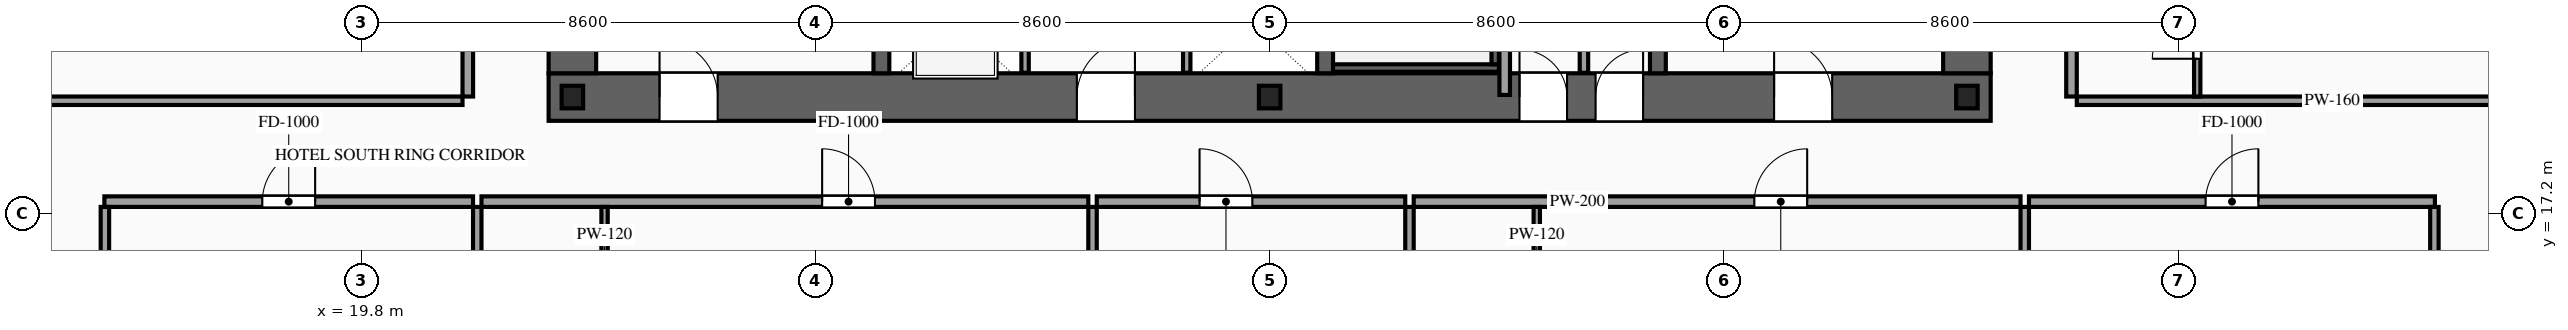
"""IFC4 building model, lengths in metres.
Left out: names, types, materials, properties, quantities, classifications, styles, units other than length and angle.
Written with IfcOpenShell. Run it as: python <this file> out.ifc"""

import sys

from ifc_helpers import new_model, si_unit, direction, frame, frame_2d, origin, origin_2d, place, context, subcontext, project, spatial, rectangle, i_section, extrude, source, transform, mapped, element, fill, save


model = new_model("IFC4")
c1 = context("Model", 3, precision=1e-05, world=origin(), true_north=direction((0.0, 1.0)))
c2 = subcontext(c1, "Body", "Model", "MODEL_VIEW")
j1 = project(units=[si_unit("LENGTHUNIT", "METRE"), si_unit("PLANEANGLEUNIT", "RADIAN")], contexts=[c1])
p1 = place(None, origin())
s1 = spatial("IfcSite", under=j1, at=p1, CompositionType="ELEMENT")
p2 = place(p1, origin())
s2 = spatial("IfcBuilding", under=s1, at=p2, CompositionType="ELEMENT")
p3 = place(p2, frame((0.0, 0.0, 82.0)))
s3 = spatial("IfcBuildingStorey", under=s2, at=p3, CompositionType="ELEMENT", Elevation=82.0)
p4 = place(p3, frame((23.35, 19.4, 0.0), z_axis=(0.0, 0.0, 1.0), x_axis=(1.0, 0.0, 0.0)))
e1 = element("IfcWall", 1, at=p4, inside=s3, PredefinedType="SHEAR", context=c2, shape_type="SweptSolid", body=[
    extrude(rectangle(XDim=27.3, YDim=0.9, at=frame_2d((13.65, 0.0))), origin(), (0.0, 0.0, 1.0), 3.6),
])
p5 = place(p4, frame((2.1, 0.0, 0.0)))
e2 = element("IfcOpeningElement", 2, at=p5, cuts=e1, PredefinedType="OPENING", context=c2, shape_type="SweptSolid", body=[
    extrude(rectangle(XDim=1.1, YDim=2.2, at=frame_2d((0.55, 1.1))), frame((0.0, 0.465, 0.0), z_axis=(0.0, -1.0, 0.0), x_axis=(1.0, 0.0, 0.0)), (0.0, 0.0, 1.0), 0.93),
])
p6 = place(p4, frame((10.0, 0.0, 0.0)))
e3 = element("IfcOpeningElement", 3, at=p6, cuts=e1, PredefinedType="OPENING", context=c2, shape_type="SweptSolid", body=[
    extrude(rectangle(XDim=1.1, YDim=2.2, at=frame_2d((0.55, 1.1))), frame((0.0, 0.465, 0.0), z_axis=(0.0, -1.0, 0.0), x_axis=(1.0, 0.0, 0.0)), (0.0, 0.0, 1.0), 0.93),
])
p7 = place(p4, frame((23.2, 0.0, 0.0)))
e4 = element("IfcOpeningElement", 4, at=p7, cuts=e1, PredefinedType="OPENING", context=c2, shape_type="SweptSolid", body=[
    extrude(rectangle(XDim=1.1, YDim=2.2, at=frame_2d((0.55, 1.1))), frame((0.0, 0.465, 0.0), z_axis=(0.0, -1.0, 0.0), x_axis=(1.0, 0.0, 0.0)), (0.0, 0.0, 1.0), 0.93),
])
p8 = place(p4, frame((19.82, 0.0, 0.0)))
e5 = element("IfcOpeningElement", 5, at=p8, cuts=e1, PredefinedType="OPENING", context=c2, shape_type="SweptSolid", body=[
    extrude(rectangle(XDim=0.9, YDim=2.15, at=frame_2d((0.45, 1.075))), frame((0.0, 0.465, 0.0), z_axis=(0.0, -1.0, 0.0), x_axis=(1.0, 0.0, 0.0)), (0.0, 0.0, 1.0), 0.93),
])
p9 = place(p4, frame((18.38, 0.0, 0.0)))
e6 = element("IfcOpeningElement", 6, at=p9, cuts=e1, PredefinedType="OPENING", context=c2, shape_type="SweptSolid", body=[
    extrude(rectangle(XDim=0.9, YDim=2.15, at=frame_2d((0.45, 1.075))), frame((0.0, 0.465, 0.0), z_axis=(0.0, -1.0, 0.0), x_axis=(1.0, 0.0, 0.0)), (0.0, 0.0, 1.0), 0.93),
])
m1 = source(origin(), c2, "Body", "SweptSolid", [
    extrude(rectangle(XDim=11.9, YDim=0.9, at=frame_2d((5.95, 0.0))), origin(), (0.0, 0.0, 1.0), 3.6),
])
for number, where, z_axis, x_axis in (
    (7, (23.8, 19.85, 0.0), (0.0, 0.0, 1.0), (0.0, 1.0, 0.0)),
    (8, (50.2, 19.85, 0.0), (0.0, 0.0, 1.0), (0.0, 1.0, 0.0)),
):
    element("IfcWall", number, at=place(p3, frame(where, z_axis=z_axis, x_axis=x_axis)), inside=s3, PredefinedType="SHEAR", context=c2, shape_type="MappedRepresentation", body=[
        mapped(m1, transform((0.0, 0.0, 0.0), scale=1.0)),
    ])
m2 = source(origin(), c2, "Body", "SweptSolid", [
    extrude(rectangle(XDim=11.9, YDim=0.3, at=frame_2d((5.95, 0.0))), origin(), (0.0, 0.0, 1.0), 3.6),
])
for number, where, z_axis, x_axis in (
    (9, (29.65, 19.85, 0.0), (0.0, 0.0, 1.0), (0.0, 1.0, 0.0)),
    (10, (38.05, 19.85, 0.0), (0.0, 0.0, 1.0), (0.0, 1.0, 0.0)),
    (11, (44.35, 19.85, 0.0), (0.0, 0.0, 1.0), (0.0, 1.0, 0.0)),
):
    element("IfcWall", number, at=place(p3, frame(where, z_axis=z_axis, x_axis=x_axis)), inside=s3, PredefinedType="SOLIDWALL", context=c2, shape_type="MappedRepresentation", body=[
        mapped(m2, transform((0.0, 0.0, 0.0), scale=1.0)),
    ])
m3 = source(origin(), c2, "Body", "SweptSolid", [
    extrude(i_section(OverallWidth=0.407, OverallDepth=0.428, WebThickness=0.02, FlangeThickness=0.035, at=origin_2d()), origin(), (0.0, 0.0, 1.0), 3.6),
])
for number, where, z_axis, x_axis in (
    (12, (23.8, 19.4, 0.0), (0.0, 0.0, 1.0), (1.0, 0.0, 0.0)),
    (13, (37.0, 19.4, 0.0), (0.0, 0.0, 1.0), (1.0, 0.0, 0.0)),
    (14, (50.2, 19.4, 0.0), (0.0, 0.0, 1.0), (1.0, 0.0, 0.0)),
):
    element("IfcColumn", number, at=place(p3, frame(where, z_axis=z_axis, x_axis=x_axis)), inside=s3, PredefinedType="COLUMN", context=c2, shape_type="MappedRepresentation", body=[
        mapped(m3, transform((0.0, 0.0, 0.0), scale=1.0)),
    ])
p10 = place(p3, frame((32.37, 19.86, 0.0), z_axis=(0.0, 0.0, 1.0), x_axis=(0.0, 1.0, 0.0)))
e15 = element("IfcWall", 15, at=p10, inside=s3, PredefinedType="SOLIDWALL", context=c2, shape_type="SweptSolid", body=[
    extrude(rectangle(XDim=2.04, YDim=0.14, at=frame_2d((1.02, 0.0))), origin(), (0.0, 0.0, 1.0), 3.32),
])
p11 = place(p10, frame((0.47, 0.0, 0.0)))
e16 = element("IfcOpeningElement", 16, at=p11, cuts=e15, PredefinedType="OPENING", context=c2, shape_type="SweptSolid", body=[
    extrude(rectangle(XDim=1.1, YDim=2.2, at=frame_2d((0.55, 1.1))), frame((0.0, 0.085, 0.0), z_axis=(0.0, -1.0, 0.0), x_axis=(1.0, 0.0, 0.0)), (0.0, 0.0, 1.0), 0.17),
])
m4 = source(origin(), c2, "Body", "SweptSolid", [
    extrude(rectangle(XDim=2.04, YDim=0.14, at=frame_2d((1.02, 0.0))), origin(), (0.0, 0.0, 1.0), 3.32),
])
p12 = place(p3, frame((35.43, 19.86, 0.0), z_axis=(0.0, 0.0, 1.0), x_axis=(0.0, 1.0, 0.0)))
e17 = element("IfcWall", 17, at=p12, inside=s3, PredefinedType="SOLIDWALL", context=c2, shape_type="MappedRepresentation", body=[
    mapped(m4, transform((0.0, 0.0, 0.0), scale=1.0)),
])
m5 = source(origin(), c2, "Body", "SweptSolid", [
    extrude(rectangle(XDim=3.14, YDim=0.14, at=frame_2d((1.57, 0.0))), origin(), (0.0, 0.0, 1.0), 3.32),
])
p13 = place(p3, frame((38.2, 19.95, 0.0), z_axis=(0.0, 0.0, 1.0), x_axis=(1.0, 0.0, 0.0)))
e18 = element("IfcWall", 18, at=p13, inside=s3, PredefinedType="SOLIDWALL", context=c2, shape_type="MappedRepresentation", body=[
    mapped(m5, transform((0.0, 0.0, 0.0), scale=1.0)),
])
m6 = source(origin(), c2, "Body", "SweptSolid", [
    extrude(rectangle(XDim=8.94, YDim=0.14, at=frame_2d((4.47, 0.0))), origin(), (0.0, 0.0, 1.0), 3.32),
])
p14 = place(p3, frame((41.27, 20.02, 0.0), z_axis=(0.0, 0.0, 1.0), x_axis=(0.0, 1.0, 0.0)))
e19 = element("IfcWall", 19, at=p14, inside=s3, PredefinedType="SOLIDWALL", context=c2, shape_type="MappedRepresentation", body=[
    mapped(m6, transform((0.0, 0.0, 0.0), scale=1.0)),
])
m7 = source(origin(), c2, "Body", "SweptSolid", [
    extrude(rectangle(XDim=1.34, YDim=0.16, at=frame_2d((0.67, 0.0))), origin(), (0.0, 0.0, 1.0), 3.32),
])
p15 = place(p3, frame((42.95, 19.86, 0.0), z_axis=(0.0, 0.0, 1.0), x_axis=(0.0, 1.0, 0.0)))
e20 = element("IfcWall", 20, at=p15, inside=s3, PredefinedType="PARTITIONING", context=c2, shape_type="MappedRepresentation", body=[
    mapped(m7, transform((0.0, 0.0, 0.0), scale=1.0)),
])
m8 = source(origin(), c2, "Body", "SweptSolid", [
    extrude(rectangle(XDim=12.72, YDim=0.2, at=frame_2d((6.36, 0.0))), origin(), (0.0, 0.0, 1.0), 3.32),
])
p16 = place(p3, frame((41.45, 19.44, 0.0), z_axis=(0.0, 0.0, 1.0), x_axis=(0.0, 1.0, 0.0)))
e21 = element("IfcWall", 21, at=p16, inside=s3, PredefinedType="PARTITIONING", context=c2, shape_type="MappedRepresentation", body=[
    mapped(m8, transform((0.0, 0.0, 0.0), scale=1.0)),
])
p17 = place(p3, frame((14.94, 17.42, 0.0), z_axis=(0.0, 0.0, 1.0), x_axis=(1.0, 0.0, 0.0)))
e22 = element("IfcWall", 22, at=p17, inside=s3, PredefinedType="PARTITIONING", context=c2, shape_type="SweptSolid", body=[
    extrude(rectangle(XDim=6.979, YDim=0.2, at=frame_2d((3.49, 0.0))), origin(), (0.0, 0.0, 1.0), 3.32),
])
p18 = place(p17, frame((2.99, 0.0, 0.0)))
e23 = element("IfcOpeningElement", 23, at=p18, cuts=e22, PredefinedType="OPENING", context=c2, shape_type="SweptSolid", body=[
    extrude(rectangle(XDim=1.0, YDim=2.2, at=frame_2d((0.5, 1.1))), frame((0.0, 0.115, 0.0), z_axis=(0.0, -1.0, 0.0), x_axis=(1.0, 0.0, 0.0)), (0.0, 0.0, 1.0), 0.23),
])
m9 = source(origin(), c2, "Body", "SweptSolid", [
    extrude(rectangle(XDim=16.47, YDim=0.16, at=frame_2d((8.235, 0.0))), origin(), (0.0, 0.0, 1.0), 3.32),
])
p19 = place(p3, frame((21.999, 0.85, 0.0), z_axis=(0.0, 0.0, 1.0), x_axis=(0.0, 1.0, 0.0)))
e24 = element("IfcWall", 24, at=p19, inside=s3, PredefinedType="PARTITIONING", context=c2, shape_type="MappedRepresentation", body=[
    mapped(m9, transform((0.0, 0.0, 0.0), scale=1.0)),
])
p20 = place(p3, frame((22.079, 17.42, 0.0), z_axis=(0.0, 0.0, 1.0), x_axis=(1.0, 0.0, 0.0)))
e25 = element("IfcWall", 25, at=p20, inside=s3, PredefinedType="PARTITIONING", context=c2, shape_type="SweptSolid", body=[
    extrude(rectangle(XDim=11.488, YDim=0.2, at=frame_2d((5.744, 0.0))), origin(), (0.0, 0.0, 1.0), 3.32),
])
p21 = place(p20, frame((6.449, 0.0, 0.0)))
e26 = element("IfcOpeningElement", 26, at=p21, cuts=e25, PredefinedType="OPENING", context=c2, shape_type="SweptSolid", body=[
    extrude(rectangle(XDim=1.0, YDim=2.2, at=frame_2d((0.5, 1.1))), frame((0.0, 0.115, 0.0), z_axis=(0.0, -1.0, 0.0), x_axis=(1.0, 0.0, 0.0)), (0.0, 0.0, 1.0), 0.23),
])
p22 = place(p3, frame((33.647, 0.85, 0.0), z_axis=(0.0, 0.0, 1.0), x_axis=(0.0, 1.0, 0.0)))
e27 = element("IfcWall", 27, at=p22, inside=s3, PredefinedType="PARTITIONING", context=c2, shape_type="MappedRepresentation", body=[
    mapped(m9, transform((0.0, 0.0, 0.0), scale=1.0)),
])
m10 = source(origin(), c2, "Body", "SweptSolid", [
    extrude(rectangle(XDim=2.42, YDim=0.12, at=frame_2d((1.21, 0.0))), origin(), (0.0, 0.0, 1.0), 3.32),
])
p23 = place(p3, frame((24.409, 14.9, 0.0), z_axis=(0.0, 0.0, 1.0), x_axis=(0.0, 1.0, 0.0)))
e28 = element("IfcWall", 28, at=p23, inside=s3, PredefinedType="PARTITIONING", context=c2, shape_type="MappedRepresentation", body=[
    mapped(m10, transform((0.0, 0.0, 0.0), scale=1.0)),
])
p24 = place(p3, frame((33.727, 17.42, 0.0), z_axis=(0.0, 0.0, 1.0), x_axis=(1.0, 0.0, 0.0)))
e29 = element("IfcWall", 29, at=p24, inside=s3, PredefinedType="PARTITIONING", context=c2, shape_type="SweptSolid", body=[
    extrude(rectangle(XDim=5.84, YDim=0.2, at=frame_2d((2.92, 0.0))), origin(), (0.0, 0.0, 1.0), 3.32),
])
p25 = place(p24, frame((1.946, 0.0, 0.0)))
e30 = element("IfcOpeningElement", 30, at=p25, cuts=e29, PredefinedType="OPENING", context=c2, shape_type="SweptSolid", body=[
    extrude(rectangle(XDim=1.0, YDim=2.2, at=frame_2d((0.5, 1.1))), frame((0.0, 0.115, 0.0), z_axis=(0.0, -1.0, 0.0), x_axis=(1.0, 0.0, 0.0)), (0.0, 0.0, 1.0), 0.23),
])
p26 = place(p3, frame((39.647, 0.85, 0.0), z_axis=(0.0, 0.0, 1.0), x_axis=(0.0, 1.0, 0.0)))
e31 = element("IfcWall", 31, at=p26, inside=s3, PredefinedType="PARTITIONING", context=c2, shape_type="MappedRepresentation", body=[
    mapped(m9, transform((0.0, 0.0, 0.0), scale=1.0)),
])
p27 = place(p3, frame((39.727, 17.42, 0.0), z_axis=(0.0, 0.0, 1.0), x_axis=(1.0, 0.0, 0.0)))
e32 = element("IfcWall", 32, at=p27, inside=s3, PredefinedType="PARTITIONING", context=c2, shape_type="SweptSolid", body=[
    extrude(rectangle(XDim=11.488, YDim=0.2, at=frame_2d((5.744, 0.0))), origin(), (0.0, 0.0, 1.0), 3.32),
])
p28 = place(p27, frame((6.449, 0.0, 0.0)))
e33 = element("IfcOpeningElement", 33, at=p28, cuts=e32, PredefinedType="OPENING", context=c2, shape_type="SweptSolid", body=[
    extrude(rectangle(XDim=1.0, YDim=2.2, at=frame_2d((0.5, 1.1))), frame((0.0, 0.115, 0.0), z_axis=(0.0, -1.0, 0.0), x_axis=(1.0, 0.0, 0.0)), (0.0, 0.0, 1.0), 0.23),
])
p29 = place(p3, frame((51.295, 0.85, 0.0), z_axis=(0.0, 0.0, 1.0), x_axis=(0.0, 1.0, 0.0)))
e34 = element("IfcWall", 34, at=p29, inside=s3, PredefinedType="PARTITIONING", context=c2, shape_type="MappedRepresentation", body=[
    mapped(m9, transform((0.0, 0.0, 0.0), scale=1.0)),
])
p30 = place(p3, frame((42.057, 14.9, 0.0), z_axis=(0.0, 0.0, 1.0), x_axis=(0.0, 1.0, 0.0)))
e35 = element("IfcWall", 35, at=p30, inside=s3, PredefinedType="PARTITIONING", context=c2, shape_type="MappedRepresentation", body=[
    mapped(m10, transform((0.0, 0.0, 0.0), scale=1.0)),
])
p31 = place(p3, frame((51.375, 17.42, 0.0), z_axis=(0.0, 0.0, 1.0), x_axis=(1.0, 0.0, 0.0)))
e36 = element("IfcWall", 36, at=p31, inside=s3, PredefinedType="PARTITIONING", context=c2, shape_type="SweptSolid", body=[
    extrude(rectangle(XDim=7.685, YDim=0.2, at=frame_2d((3.843, 0.0))), origin(), (0.0, 0.0, 1.0), 3.32),
])
p32 = place(p31, frame((3.343, 0.0, 0.0)))
e37 = element("IfcOpeningElement", 37, at=p32, cuts=e36, PredefinedType="OPENING", context=c2, shape_type="SweptSolid", body=[
    extrude(rectangle(XDim=1.0, YDim=2.2, at=frame_2d((0.5, 1.1))), frame((0.0, 0.115, 0.0), z_axis=(0.0, -1.0, 0.0), x_axis=(1.0, 0.0, 0.0)), (0.0, 0.0, 1.0), 0.23),
])
m11 = source(origin(), c2, "Body", "SweptSolid", [
    extrude(rectangle(XDim=16.32, YDim=0.16, at=frame_2d((8.16, 0.0))), origin(), (0.0, 0.0, 1.0), 3.32),
])
for number, where, z_axis, x_axis in (
    (38, (14.95, 1.0, 0.0), (0.0, 0.0, 1.0), (0.0, 1.0, 0.0)),
    (39, (59.05, 1.0, 0.0), (0.0, 0.0, 1.0), (0.0, 1.0, 0.0)),
):
    element("IfcWall", number, at=place(p3, frame(where, z_axis=z_axis, x_axis=x_axis)), inside=s3, PredefinedType="PARTITIONING", context=c2, shape_type="MappedRepresentation", body=[
        mapped(m11, transform((0.0, 0.0, 0.0), scale=1.0)),
    ])
p33 = place(p3, frame((21.82, 19.41, 0.0), z_axis=(0.0, 0.0, 1.0), x_axis=(0.0, 1.0, 0.0)))
e40 = element("IfcWall", 40, at=p33, inside=s3, PredefinedType="PARTITIONING", context=c2, shape_type="SweptSolid", body=[
    extrude(rectangle(XDim=6.31, YDim=0.2, at=frame_2d((3.155, 0.0))), origin(), (0.0, 0.0, 1.0), 3.32),
])
p34 = place(p33, frame((2.655, 0.0, 0.0)))
e41 = element("IfcOpeningElement", 41, at=p34, cuts=e40, PredefinedType="OPENING", context=c2, shape_type="SweptSolid", body=[
    extrude(rectangle(XDim=1.0, YDim=2.2, at=frame_2d((0.5, 1.1))), frame((0.0, 0.115, 0.0), z_axis=(0.0, -1.0, 0.0), x_axis=(1.0, 0.0, 0.0)), (0.0, 0.0, 1.0), 0.23),
])
m12 = source(origin(), c2, "Body", "SweptSolid", [
    extrude(rectangle(XDim=9.67, YDim=0.16, at=frame_2d((4.835, 0.0))), origin(), (0.0, 0.0, 1.0), 3.32),
])
p35 = place(p3, frame((12.05, 19.33, 0.0), z_axis=(0.0, 0.0, 1.0), x_axis=(1.0, 0.0, 0.0)))
e42 = element("IfcWall", 42, at=p35, inside=s3, PredefinedType="PARTITIONING", context=c2, shape_type="MappedRepresentation", body=[
    mapped(m12, transform((0.0, 0.0, 0.0), scale=1.0)),
])
p36 = place(p3, frame((52.18, 19.41, 0.0), z_axis=(0.0, 0.0, 1.0), x_axis=(0.0, 1.0, 0.0)))
e43 = element("IfcWall", 43, at=p36, inside=s3, PredefinedType="PARTITIONING", context=c2, shape_type="SweptSolid", body=[
    extrude(rectangle(XDim=6.31, YDim=0.2, at=frame_2d((3.155, 0.0))), origin(), (0.0, 0.0, 1.0), 3.32),
])
p37 = place(p36, frame((3.835, 0.0, 0.0)))
e44 = element("IfcOpeningElement", 44, at=p37, cuts=e43, PredefinedType="OPENING", context=c2, shape_type="SweptSolid", body=[
    extrude(rectangle(XDim=1.0, YDim=2.2, at=frame_2d((0.5, 1.1))), frame((0.0, 0.115, 0.0), z_axis=(0.0, -1.0, 0.0), x_axis=(1.0, 0.0, 0.0)), (0.0, 0.0, 1.0), 0.23),
])
p38 = place(p3, frame((52.28, 19.33, 0.0), z_axis=(0.0, 0.0, 1.0), x_axis=(1.0, 0.0, 0.0)))
e45 = element("IfcWall", 45, at=p38, inside=s3, PredefinedType="PARTITIONING", context=c2, shape_type="MappedRepresentation", body=[
    mapped(m12, transform((0.0, 0.0, 0.0), scale=1.0)),
])
p39 = place(p3, frame((54.56, 19.41, 0.0), z_axis=(0.0, 0.0, 1.0), x_axis=(0.0, 1.0, 0.0)))
e46 = element("IfcWall", 46, at=p39, inside=s3, PredefinedType="PARTITIONING", context=c2, shape_type="SweptSolid", body=[
    extrude(rectangle(XDim=2.28, YDim=0.12, at=frame_2d((1.14, 0.0))), origin(), (0.0, 0.0, 1.0), 3.32),
])
p40 = place(p39, frame((0.715, 0.0, 0.0)))
e47 = element("IfcOpeningElement", 47, at=p40, cuts=e46, PredefinedType="OPENING", context=c2, shape_type="SweptSolid", body=[
    extrude(rectangle(XDim=0.85, YDim=2.1, at=frame_2d((0.425, 1.05))), frame((0.0, 0.075, 0.0), z_axis=(0.0, -1.0, 0.0), x_axis=(1.0, 0.0, 0.0)), (0.0, 0.0, 1.0), 0.15),
])
m13 = source(origin(), c2, "Body", "SweptSolid", [
    extrude(rectangle(XDim=1.1, YDim=2.2, at=frame_2d((0.55, 1.1))), frame((0.0, 0.025, 0.0), z_axis=(0.0, -1.0, 0.0), x_axis=(1.0, 0.0, 0.0)), (0.0, 0.0, 1.0), 0.05),
])
p41 = place(p5, origin())
e48 = element("IfcDoor", 48, at=p41, inside=s3, OperationType="SINGLE_SWING_LEFT", PredefinedType="DOOR", context=c2, shape_type="MappedRepresentation", body=[
    mapped(m13, transform((0.0, 0.0, 0.0), scale=1.0)),
])
fill(e2, e48)
p42 = place(p6, origin())
e49 = element("IfcDoor", 49, at=p42, inside=s3, OperationType="SINGLE_SWING_RIGHT", PredefinedType="DOOR", context=c2, shape_type="MappedRepresentation", body=[
    mapped(m13, transform((0.0, 0.0, 0.0), scale=1.0)),
])
fill(e3, e49)
p43 = place(p7, origin())
e50 = element("IfcDoor", 50, at=p43, inside=s3, OperationType="SINGLE_SWING_LEFT", PredefinedType="DOOR", context=c2, shape_type="MappedRepresentation", body=[
    mapped(m13, transform((0.0, 0.0, 0.0), scale=1.0)),
])
fill(e4, e50)
m14 = source(origin(), c2, "Body", "SweptSolid", [
    extrude(rectangle(XDim=0.9, YDim=2.15, at=frame_2d((0.45, 1.075))), frame((0.0, 0.025, 0.0), z_axis=(0.0, -1.0, 0.0), x_axis=(1.0, 0.0, 0.0)), (0.0, 0.0, 1.0), 0.05),
])
p44 = place(p8, origin())
e51 = element("IfcDoor", 51, at=p44, inside=s3, OperationType="SINGLE_SWING_RIGHT", PredefinedType="DOOR", context=c2, shape_type="MappedRepresentation", body=[
    mapped(m14, transform((0.0, 0.0, 0.0), scale=1.0)),
])
fill(e5, e51)
p45 = place(p9, origin())
e52 = element("IfcDoor", 52, at=p45, inside=s3, OperationType="SINGLE_SWING_LEFT", PredefinedType="DOOR", context=c2, shape_type="MappedRepresentation", body=[
    mapped(m14, transform((0.0, 0.0, 0.0), scale=1.0)),
])
fill(e6, e52)
m15 = source(origin(), c2, "Body", "SweptSolid", [
    extrude(rectangle(XDim=1.0, YDim=2.2, at=frame_2d((0.5, 1.1))), frame((0.0, 0.025, 0.0), z_axis=(0.0, -1.0, 0.0), x_axis=(1.0, 0.0, 0.0)), (0.0, 0.0, 1.0), 0.05),
])
p46 = place(p18, origin())
e53 = element("IfcDoor", 53, at=p46, inside=s3, OperationType="SINGLE_SWING_RIGHT", PredefinedType="DOOR", context=c2, shape_type="MappedRepresentation", body=[
    mapped(m15, transform((0.0, 0.0, 0.0), scale=1.0)),
])
fill(e23, e53)
p47 = place(p21, origin())
e54 = element("IfcDoor", 54, at=p47, inside=s3, OperationType="SINGLE_SWING_LEFT", PredefinedType="DOOR", context=c2, shape_type="MappedRepresentation", body=[
    mapped(m15, transform((0.0, 0.0, 0.0), scale=1.0)),
])
fill(e26, e54)
p48 = place(p25, origin())
e55 = element("IfcDoor", 55, at=p48, inside=s3, OperationType="SINGLE_SWING_LEFT", PredefinedType="DOOR", context=c2, shape_type="MappedRepresentation", body=[
    mapped(m15, transform((0.0, 0.0, 0.0), scale=1.0)),
])
fill(e30, e55)
p49 = place(p28, origin())
e56 = element("IfcDoor", 56, at=p49, inside=s3, OperationType="SINGLE_SWING_RIGHT", PredefinedType="DOOR", context=c2, shape_type="MappedRepresentation", body=[
    mapped(m15, transform((0.0, 0.0, 0.0), scale=1.0)),
])
fill(e33, e56)
p50 = place(p32, origin())
e57 = element("IfcDoor", 57, at=p50, inside=s3, OperationType="SINGLE_SWING_RIGHT", PredefinedType="DOOR", context=c2, shape_type="MappedRepresentation", body=[
    mapped(m15, transform((0.0, 0.0, 0.0), scale=1.0)),
])
fill(e37, e57)
m16 = source(origin(), c2, "Body", "SweptSolid", [
    extrude(rectangle(XDim=0.85, YDim=2.1, at=frame_2d((0.425, 1.05))), frame((0.0, 0.025, 0.0), z_axis=(0.0, -1.0, 0.0), x_axis=(1.0, 0.0, 0.0)), (0.0, 0.0, 1.0), 0.05),
])
p51 = place(p40, origin())
e58 = element("IfcDoor", 58, at=p51, inside=s3, OperationType="SINGLE_SWING_LEFT", PredefinedType="DOOR", context=c2, shape_type="MappedRepresentation", body=[
    mapped(m16, transform((0.0, 0.0, 0.0), scale=1.0)),
])
fill(e47, e58)
save(model, sys.argv[1])
